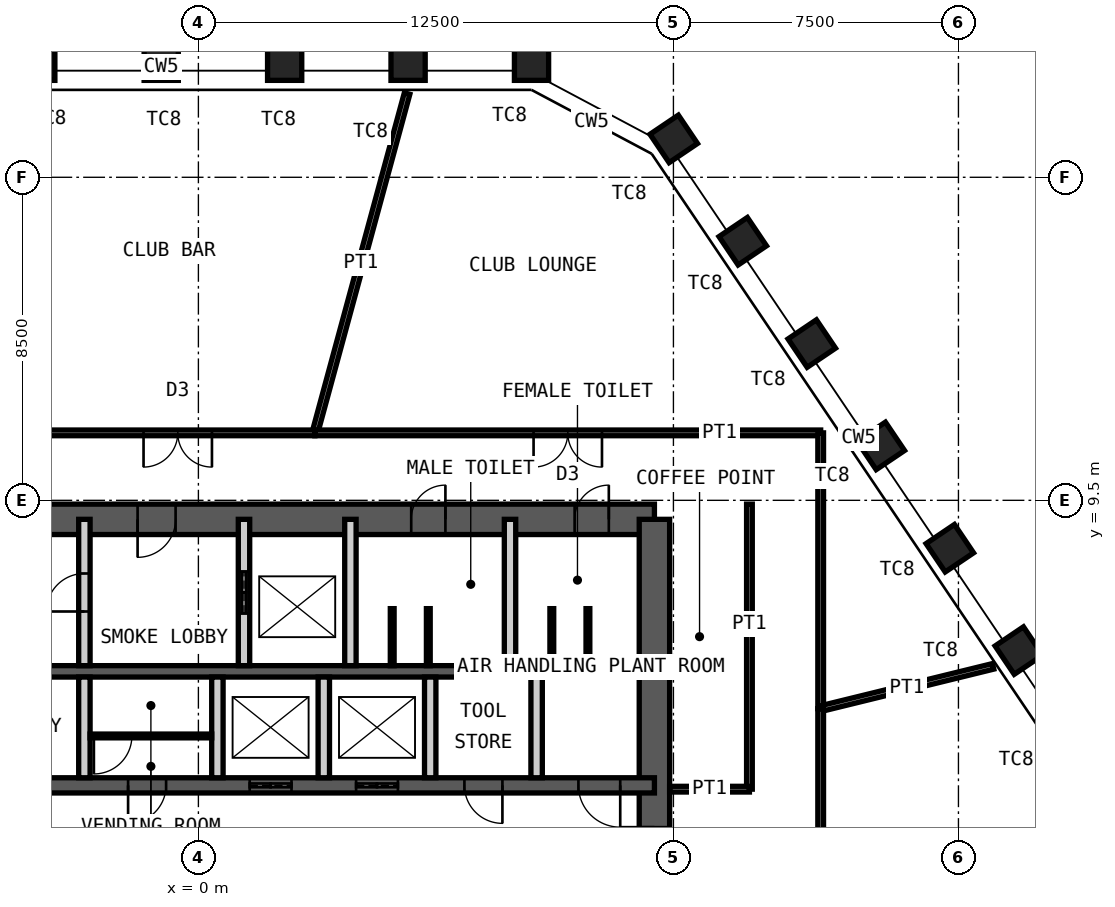
"""IFC4 building model, lengths in metres.
Left out: names, types, materials, properties, quantities, classifications, styles, units other than length and angle.
Written with IfcOpenShell. Run it as: python <this file> out.ifc"""

import sys

from ifc_helpers import new_model, si_unit, direction, frame, frame_2d, origin, origin_2d, place, context, subcontext, project, spatial, rectangle, hollow_rectangle, extrude, element, fill, save


model = new_model("IFC4")
c1 = context("Model", 3, precision=1e-05, world=origin(), true_north=direction((0.0, 1.0)))
c2 = subcontext(c1, "Body", "Model", "MODEL_VIEW")
j1 = project(units=[si_unit("LENGTHUNIT", "METRE"), si_unit("PLANEANGLEUNIT", "RADIAN")], contexts=[c1])
p1 = place(None, origin())
s1 = spatial("IfcSite", under=j1, at=p1, CompositionType="ELEMENT")
p2 = place(p1, origin())
s2 = spatial("IfcBuilding", under=s1, at=p2, CompositionType="ELEMENT")
p3 = place(p2, frame((0.0, 0.0, 320.8)))
s3 = spatial("IfcBuildingStorey", under=s2, at=p3, CompositionType="ELEMENT", Elevation=320.8)
for number, where, z_axis, x_axis in (
    (1, (-4.226, 21.0, 0.0), (0.0, 0.0, 1.0), (-1.0, 0.0, 0.0)),
    (2, (-0.978, 21.0, 0.0), (0.0, 0.0, 1.0), (-1.0, 0.0, 0.0)),
    (3, (2.27, 21.0, 0.0), (0.0, 0.0, 1.0), (-1.0, 0.0, 0.0)),
    (4, (5.518, 21.0, 0.0), (0.0, 0.0, 1.0), (-1.0, 0.0, 0.0)),
    (5, (8.766, 21.0, 0.0), (0.0, 0.0, 1.0), (-1.0, 0.0, 0.0)),
    (6, (12.508, 19.01, 0.0), (0.0, 0.0, 1.0), (-0.559, 0.829, 0.0)),
    (7, (14.324, 16.318, 0.0), (0.0, 0.0, 1.0), (-0.559, 0.829, 0.0)),
    (8, (16.141, 13.625, 0.0), (0.0, 0.0, 1.0), (-0.559, 0.829, 0.0)),
    (9, (17.957, 10.932, 0.0), (0.0, 0.0, 1.0), (-0.559, 0.829, 0.0)),
    (10, (19.773, 8.239, 0.0), (0.0, 0.0, 1.0), (-0.559, 0.829, 0.0)),
    (11, (21.589, 5.547, 0.0), (0.0, 0.0, 1.0), (-0.559, 0.829, 0.0)),
):
    element("IfcColumn", number, at=place(p3, frame(where, z_axis=z_axis, x_axis=x_axis)), inside=s3, PredefinedType="COLUMN", context=c2, shape_type="SweptSolid", body=[
        extrude(hollow_rectangle(XDim=0.9, YDim=0.9, WallThickness=0.05, at=origin_2d()), origin(), (0.0, 0.0, 1.0), 4.2),
    ])
p4 = place(p3, frame((-12.0, 9.0, 0.0), z_axis=(0.0, 0.0, 1.0), x_axis=(1.0, 0.0, 0.0)))
e12 = element("IfcWall", 12, at=p4, inside=s3, PredefinedType="SHEAR", context=c2, shape_type="SweptSolid", body=[
    extrude(rectangle(XDim=24.0, YDim=0.8, at=frame_2d((12.0, 0.0))), origin(), (0.0, 0.0, 1.0), 4.2),
])
p5 = place(p4, frame((10.4, 0.0, 0.0)))
e13 = element("IfcOpeningElement", 13, at=p5, cuts=e12, PredefinedType="OPENING", context=c2, shape_type="SweptSolid", body=[
    extrude(rectangle(XDim=1.0, YDim=2.1, at=frame_2d((0.5, 1.05))), frame((0.0, 0.41, 0.0), z_axis=(0.0, -1.0, 0.0), x_axis=(1.0, 0.0, 0.0)), (0.0, 0.0, 1.0), 0.82),
])
p6 = place(p4, frame((17.6, 0.0, 0.0)))
e14 = element("IfcOpeningElement", 14, at=p6, cuts=e12, PredefinedType="OPENING", context=c2, shape_type="SweptSolid", body=[
    extrude(rectangle(XDim=0.9, YDim=2.1, at=frame_2d((0.45, 1.05))), frame((0.0, 0.41, 0.0), z_axis=(0.0, -1.0, 0.0), x_axis=(1.0, 0.0, 0.0)), (0.0, 0.0, 1.0), 0.82),
])
p7 = place(p4, frame((21.9, 0.0, 0.0)))
e15 = element("IfcOpeningElement", 15, at=p7, cuts=e12, PredefinedType="OPENING", context=c2, shape_type="SweptSolid", body=[
    extrude(rectangle(XDim=0.9, YDim=2.1, at=frame_2d((0.45, 1.05))), frame((0.0, 0.41, 0.0), z_axis=(0.0, -1.0, 0.0), x_axis=(1.0, 0.0, 0.0)), (0.0, 0.0, 1.0), 0.82),
])
p8 = place(p3, frame((12.0, -9.0, 0.0), z_axis=(0.0, 0.0, 1.0), x_axis=(0.0, 1.0, 0.0)))
e16 = element("IfcWall", 16, at=p8, inside=s3, PredefinedType="SHEAR", context=c2, shape_type="SweptSolid", body=[
    extrude(rectangle(XDim=18.0, YDim=0.8, at=frame_2d((9.0, 0.0))), origin(), (0.0, 0.0, 1.0), 4.2),
])
p9 = place(p8, frame((8.1, 0.0, 0.0)))
e17 = element("IfcOpeningElement", 17, at=p9, cuts=e16, PredefinedType="OPENING", context=c2, shape_type="SweptSolid", body=[
    extrude(rectangle(XDim=1.8, YDim=2.1, at=frame_2d((0.9, 1.05))), frame((0.0, 0.41, 0.0), z_axis=(0.0, -1.0, 0.0), x_axis=(1.0, 0.0, 0.0)), (0.0, 0.0, 1.0), 0.82),
])
p10 = place(p3, frame((-12.0, 5.0, 0.0), z_axis=(0.0, 0.0, 1.0), x_axis=(1.0, 0.0, 0.0)))
e18 = element("IfcWall", 18, at=p10, inside=s3, PredefinedType="SHEAR", context=c2, shape_type="SweptSolid", body=[
    extrude(rectangle(XDim=24.0, YDim=0.3, at=frame_2d((12.0, 0.0))), origin(), (0.0, 0.0, 1.0), 4.2),
])
p11 = place(p3, frame((-12.0, 2.0, 0.0), z_axis=(0.0, 0.0, 1.0), x_axis=(1.0, 0.0, 0.0)))
e19 = element("IfcWall", 19, at=p11, inside=s3, PredefinedType="SHEAR", context=c2, shape_type="SweptSolid", body=[
    extrude(rectangle(XDim=24.0, YDim=0.4, at=frame_2d((12.0, 0.0))), origin(), (0.0, 0.0, 1.0), 4.2),
])
p12 = place(p11, frame((2.4, 0.0, 0.0)))
e20 = element("IfcOpeningElement", 20, at=p12, cuts=e19, PredefinedType="OPENING", context=c2, shape_type="SweptSolid", body=[
    extrude(rectangle(XDim=1.1, YDim=2.1, at=frame_2d((0.55, 1.05))), frame((0.0, 0.21, 0.0), z_axis=(0.0, -1.0, 0.0), x_axis=(1.0, 0.0, 0.0)), (0.0, 0.0, 1.0), 0.42),
])
p13 = place(p11, frame((22.0, 0.0, 0.0)))
e21 = element("IfcOpeningElement", 21, at=p13, cuts=e19, PredefinedType="OPENING", context=c2, shape_type="SweptSolid", body=[
    extrude(rectangle(XDim=1.1, YDim=2.1, at=frame_2d((0.55, 1.05))), frame((0.0, 0.21, 0.0), z_axis=(0.0, -1.0, 0.0), x_axis=(1.0, 0.0, 0.0)), (0.0, 0.0, 1.0), 0.42),
])
p14 = place(p11, frame((10.15, 0.0, 0.0)))
e22 = element("IfcOpeningElement", 22, at=p14, cuts=e19, PredefinedType="OPENING", context=c2, shape_type="SweptSolid", body=[
    extrude(rectangle(XDim=1.0, YDim=2.1, at=frame_2d((0.5, 1.05))), frame((0.0, 0.21, 0.0), z_axis=(0.0, -1.0, 0.0), x_axis=(1.0, 0.0, 0.0)), (0.0, 0.0, 1.0), 0.42),
])
p15 = place(p11, frame((6.9, 0.0, 0.0)))
e23 = element("IfcOpeningElement", 23, at=p15, cuts=e19, PredefinedType="OPENING", context=c2, shape_type="SweptSolid", body=[
    extrude(rectangle(XDim=1.0, YDim=2.1, at=frame_2d((0.5, 1.05))), frame((0.0, 0.21, 0.0), z_axis=(0.0, -1.0, 0.0), x_axis=(1.0, 0.0, 0.0)), (0.0, 0.0, 1.0), 0.42),
])
p16 = place(p11, frame((13.35, 0.0, 0.0)))
e24 = element("IfcOpeningElement", 24, at=p16, cuts=e19, PredefinedType="OPENING", context=c2, shape_type="SweptSolid", body=[
    extrude(rectangle(XDim=1.1, YDim=2.4, at=frame_2d((0.55, 1.2))), frame((0.0, 0.21, 0.0), z_axis=(0.0, -1.0, 0.0), x_axis=(1.0, 0.0, 0.0)), (0.0, 0.0, 1.0), 0.42),
])
p17 = place(p11, frame((16.15, 0.0, 0.0)))
e25 = element("IfcOpeningElement", 25, at=p17, cuts=e19, PredefinedType="OPENING", context=c2, shape_type="SweptSolid", body=[
    extrude(rectangle(XDim=1.1, YDim=2.4, at=frame_2d((0.55, 1.2))), frame((0.0, 0.21, 0.0), z_axis=(0.0, -1.0, 0.0), x_axis=(1.0, 0.0, 0.0)), (0.0, 0.0, 1.0), 0.42),
])
p18 = place(p11, frame((19.0, 0.0, 0.0)))
e26 = element("IfcOpeningElement", 26, at=p18, cuts=e19, PredefinedType="OPENING", context=c2, shape_type="SweptSolid", body=[
    extrude(rectangle(XDim=1.0, YDim=2.1, at=frame_2d((0.5, 1.05))), frame((0.0, 0.21, 0.0), z_axis=(0.0, -1.0, 0.0), x_axis=(1.0, 0.0, 0.0)), (0.0, 0.0, 1.0), 0.42),
])
p19 = place(p3, frame((-3.0, 5.15, 0.0), z_axis=(0.0, 0.0, 1.0), x_axis=(0.0, 1.0, 0.0)))
e27 = element("IfcWall", 27, at=p19, inside=s3, PredefinedType="PARTITIONING", context=c2, shape_type="SweptSolid", body=[
    extrude(rectangle(XDim=3.85, YDim=0.3, at=frame_2d((1.925, 0.0))), origin(), (0.0, 0.0, 1.0), 3.98),
])
p20 = place(p19, frame((1.425, 0.0, 0.0)))
e28 = element("IfcOpeningElement", 28, at=p20, cuts=e27, PredefinedType="OPENING", context=c2, shape_type="SweptSolid", body=[
    extrude(rectangle(XDim=1.0, YDim=2.1, at=frame_2d((0.5, 1.05))), frame((0.0, 0.16, 0.0), z_axis=(0.0, -1.0, 0.0), x_axis=(1.0, 0.0, 0.0)), (0.0, 0.0, 1.0), 0.32),
])
p21 = place(p3, frame((1.2, 5.15, 0.0), z_axis=(0.0, 0.0, 1.0), x_axis=(0.0, 1.0, 0.0)))
e29 = element("IfcWall", 29, at=p21, inside=s3, PredefinedType="PARTITIONING", context=c2, shape_type="SweptSolid", body=[
    extrude(rectangle(XDim=3.85, YDim=0.3, at=frame_2d((1.925, 0.0))), origin(), (0.0, 0.0, 1.0), 3.98),
])
p22 = place(p21, frame((1.375, 0.0, 0.0)))
e30 = element("IfcOpeningElement", 30, at=p22, cuts=e29, PredefinedType="OPENING", context=c2, shape_type="SweptSolid", body=[
    extrude(rectangle(XDim=1.1, YDim=2.4, at=frame_2d((0.55, 1.2))), frame((0.0, 0.16, 0.0), z_axis=(0.0, -1.0, 0.0), x_axis=(1.0, 0.0, 0.0)), (0.0, 0.0, 1.0), 0.32),
])
for number, where, z_axis, x_axis in (
    (31, (4.0, 5.15, 0.0), (0.0, 0.0, 1.0), (0.0, 1.0, 0.0)),
    (32, (8.2, 5.15, 0.0), (0.0, 0.0, 1.0), (0.0, 1.0, 0.0)),
):
    element("IfcWall", number, at=place(p3, frame(where, z_axis=z_axis, x_axis=x_axis)), inside=s3, PredefinedType="PARTITIONING", context=c2, shape_type="SweptSolid", body=[
        extrude(rectangle(XDim=3.85, YDim=0.3, at=frame_2d((1.925, 0.0))), origin(), (0.0, 0.0, 1.0), 3.98),
    ])
for number, where, z_axis, x_axis in (
    (33, (-3.0, 2.2, 0.0), (0.0, 0.0, 1.0), (0.0, 1.0, 0.0)),
    (34, (0.5, 2.2, 0.0), (0.0, 0.0, 1.0), (0.0, 1.0, 0.0)),
    (35, (3.3, 2.2, 0.0), (0.0, 0.0, 1.0), (0.0, 1.0, 0.0)),
    (36, (6.1, 2.2, 0.0), (0.0, 0.0, 1.0), (0.0, 1.0, 0.0)),
    (37, (8.9, 2.2, 0.0), (0.0, 0.0, 1.0), (0.0, 1.0, 0.0)),
):
    element("IfcWall", number, at=place(p3, frame(where, z_axis=z_axis, x_axis=x_axis)), inside=s3, PredefinedType="PARTITIONING", context=c2, shape_type="SweptSolid", body=[
        extrude(rectangle(XDim=2.65, YDim=0.3, at=frame_2d((1.325, 0.0))), origin(), (0.0, 0.0, 1.0), 3.98),
    ])
p23 = place(p3, frame((-2.85, 3.3, 0.0), z_axis=(0.0, 0.0, 1.0), x_axis=(1.0, 0.0, 0.0)))
e38 = element("IfcWall", 38, at=p23, inside=s3, PredefinedType="PARTITIONING", context=c2, shape_type="SweptSolid", body=[
    extrude(rectangle(XDim=3.2, YDim=0.1, at=frame_2d((1.6, 0.0))), origin(), (0.0, 0.0, 1.0), 3.98),
])
p24 = place(p23, frame((0.1, 0.0, 0.0)))
e39 = element("IfcOpeningElement", 39, at=p24, cuts=e38, PredefinedType="OPENING", context=c2, shape_type="SweptSolid", body=[
    extrude(rectangle(XDim=1.0, YDim=2.4, at=frame_2d((0.5, 1.2))), frame((0.0, 0.06, 0.0), z_axis=(0.0, -1.0, 0.0), x_axis=(1.0, 0.0, 0.0)), (0.0, 0.0, 1.0), 0.12),
])
for number, where, z_axis, x_axis in (
    (40, (5.1, 5.15, 0.0), (0.0, 0.0, 1.0), (0.0, 1.0, 0.0)),
    (41, (6.05, 5.15, 0.0), (0.0, 0.0, 1.0), (0.0, 1.0, 0.0)),
    (42, (9.3, 5.15, 0.0), (0.0, 0.0, 1.0), (0.0, 1.0, 0.0)),
    (43, (10.25, 5.15, 0.0), (0.0, 0.0, 1.0), (0.0, 1.0, 0.0)),
):
    element("IfcWall", number, at=place(p3, frame(where, z_axis=z_axis, x_axis=x_axis)), inside=s3, PredefinedType="PARTITIONING", context=c2, shape_type="SweptSolid", body=[
        extrude(rectangle(XDim=1.5, YDim=0.1, at=frame_2d((0.75, 0.0))), origin(), (0.0, 0.0, 1.0), 2.1),
    ])
p25 = place(p3, frame((5.492, 20.204, 0.0), z_axis=(0.0, 0.0, 1.0), x_axis=(-0.262302393053, -0.964985727666, 0.0)))
e44 = element("IfcWall", 44, at=p25, inside=s3, PredefinedType="PARTITIONING", context=c2, shape_type="SweptSolid", body=[
    extrude(rectangle(XDim=9.253, YDim=0.15, at=frame_2d((4.626, 0.0))), origin(), (0.0, 0.0, 1.0), 3.33),
])
p26 = place(p3, frame((3.065, 11.275, 0.0), z_axis=(0.0, 0.0, 1.0), x_axis=(1.0, 0.0, 0.0)))
e45 = element("IfcWall", 45, at=p26, inside=s3, PredefinedType="PARTITIONING", context=c2, shape_type="SweptSolid", body=[
    extrude(rectangle(XDim=13.31, YDim=0.15, at=frame_2d((6.655, 0.0))), origin(), (0.0, 0.0, 1.0), 4.03),
])
p27 = place(p26, frame((5.755, 0.0, 0.0)))
e46 = element("IfcOpeningElement", 46, at=p27, cuts=e45, PredefinedType="OPENING", context=c2, shape_type="SweptSolid", body=[
    extrude(rectangle(XDim=1.8, YDim=2.4, at=frame_2d((0.9, 1.2))), frame((0.0, 0.085, 0.0), z_axis=(0.0, -1.0, 0.0), x_axis=(1.0, 0.0, 0.0)), (0.0, 0.0, 1.0), 0.17),
])
p28 = place(p3, frame((16.375, 11.275, 0.0), z_axis=(0.0, 0.0, 1.0), x_axis=(0.0, -1.0, 0.0)))
e47 = element("IfcWall", 47, at=p28, inside=s3, PredefinedType="PARTITIONING", context=c2, shape_type="SweptSolid", body=[
    extrude(rectangle(XDim=7.257, YDim=0.15, at=frame_2d((3.628, 0.0))), origin(), (0.0, 0.0, 1.0), 4.03),
])
p29 = place(p3, frame((20.912, 5.131, 0.0), z_axis=(0.0, 0.0, 1.0), x_axis=(-0.97118779717, -0.238315468713, 0.0)))
e48 = element("IfcWall", 48, at=p29, inside=s3, PredefinedType="PARTITIONING", context=c2, shape_type="SweptSolid", body=[
    extrude(rectangle(XDim=4.671, YDim=0.15, at=frame_2d((2.336, 0.0))), origin(), (0.0, 0.0, 1.0), 4.03),
])
p30 = place(p3, frame((16.375, 4.018, 0.0), z_axis=(0.0, 0.0, 1.0), x_axis=(0.0, -1.0, 0.0)))
e49 = element("IfcWall", 49, at=p30, inside=s3, PredefinedType="PARTITIONING", context=c2, shape_type="SweptSolid", body=[
    extrude(rectangle(XDim=15.293, YDim=0.15, at=frame_2d((7.646, 0.0))), origin(), (0.0, 0.0, 1.0), 4.03),
])
p31 = place(p30, frame((6.747, 0.0, 0.0)))
e50 = element("IfcOpeningElement", 50, at=p31, cuts=e49, PredefinedType="OPENING", context=c2, shape_type="SweptSolid", body=[
    extrude(rectangle(XDim=1.8, YDim=2.4, at=frame_2d((0.9, 1.2))), frame((0.0, 0.085, 0.0), z_axis=(0.0, -1.0, 0.0), x_axis=(1.0, 0.0, 0.0)), (0.0, 0.0, 1.0), 0.17),
])
p32 = place(p3, frame((-4.151, 11.275, 0.0), z_axis=(0.0, 0.0, 1.0), x_axis=(1.0, 0.0, 0.0)))
e51 = element("IfcWall", 51, at=p32, inside=s3, PredefinedType="PARTITIONING", context=c2, shape_type="SweptSolid", body=[
    extrude(rectangle(XDim=7.216, YDim=0.15, at=frame_2d((3.608, 0.0))), origin(), (0.0, 0.0, 1.0), 4.03),
])
p33 = place(p32, frame((2.708, 0.0, 0.0)))
e52 = element("IfcOpeningElement", 52, at=p33, cuts=e51, PredefinedType="OPENING", context=c2, shape_type="SweptSolid", body=[
    extrude(rectangle(XDim=1.8, YDim=2.4, at=frame_2d((0.9, 1.2))), frame((0.0, 0.085, 0.0), z_axis=(0.0, -1.0, 0.0), x_axis=(1.0, 0.0, 0.0)), (0.0, 0.0, 1.0), 0.17),
])
p34 = place(p3, frame((14.5, 1.9, 0.0), z_axis=(0.0, 0.0, 1.0), x_axis=(0.0, 1.0, 0.0)))
e53 = element("IfcWall", 53, at=p34, inside=s3, PredefinedType="PARTITIONING", context=c2, shape_type="SweptSolid", body=[
    extrude(rectangle(XDim=7.5, YDim=0.15, at=frame_2d((3.75, 0.0))), origin(), (0.0, 0.0, 1.0), 4.03),
])
p35 = place(p3, frame((12.4, 1.9, 0.0), z_axis=(0.0, 0.0, 1.0), x_axis=(1.0, 0.0, 0.0)))
e54 = element("IfcWall", 54, at=p35, inside=s3, PredefinedType="PARTITIONING", context=c2, shape_type="SweptSolid", body=[
    extrude(rectangle(XDim=2.1, YDim=0.15, at=frame_2d((1.05, 0.0))), origin(), (0.0, 0.0, 1.0), 2.93),
])
p36 = place(p5, origin())
e55 = element("IfcDoor", 55, at=p36, inside=s3, OperationType="SINGLE_SWING_LEFT", PredefinedType="DOOR", context=c2, shape_type="SweptSolid", body=[
    extrude(rectangle(XDim=1.0, YDim=2.1, at=frame_2d((0.5, 1.05))), frame((0.0, 0.025, 0.0), z_axis=(0.0, -1.0, 0.0), x_axis=(1.0, 0.0, 0.0)), (0.0, 0.0, 1.0), 0.05),
])
fill(e13, e55)
p37 = place(p6, origin())
e56 = element("IfcDoor", 56, at=p37, inside=s3, OperationType="SINGLE_SWING_LEFT", PredefinedType="DOOR", context=c2, shape_type="SweptSolid", body=[
    extrude(rectangle(XDim=0.9, YDim=2.1, at=frame_2d((0.45, 1.05))), frame((0.0, 0.025, 0.0), z_axis=(0.0, -1.0, 0.0), x_axis=(1.0, 0.0, 0.0)), (0.0, 0.0, 1.0), 0.05),
])
fill(e14, e56)
p38 = place(p7, origin())
e57 = element("IfcDoor", 57, at=p38, inside=s3, OperationType="SINGLE_SWING_LEFT", PredefinedType="DOOR", context=c2, shape_type="SweptSolid", body=[
    extrude(rectangle(XDim=0.9, YDim=2.1, at=frame_2d((0.45, 1.05))), frame((0.0, 0.025, 0.0), z_axis=(0.0, -1.0, 0.0), x_axis=(1.0, 0.0, 0.0)), (0.0, 0.0, 1.0), 0.05),
])
fill(e15, e57)
p39 = place(p20, origin())
e58 = element("IfcDoor", 58, at=p39, inside=s3, OperationType="SINGLE_SWING_RIGHT", PredefinedType="DOOR", context=c2, shape_type="SweptSolid", body=[
    extrude(rectangle(XDim=1.0, YDim=2.1, at=frame_2d((0.5, 1.05))), frame((0.0, 0.025, 0.0), z_axis=(0.0, -1.0, 0.0), x_axis=(1.0, 0.0, 0.0)), (0.0, 0.0, 1.0), 0.05),
])
fill(e28, e58)
p40 = place(p13, origin())
e59 = element("IfcDoor", 59, at=p40, inside=s3, OperationType="SINGLE_SWING_RIGHT", PredefinedType="DOOR", context=c2, shape_type="SweptSolid", body=[
    extrude(rectangle(XDim=1.1, YDim=2.1, at=frame_2d((0.55, 1.05))), frame((0.0, 0.025, 0.0), z_axis=(0.0, -1.0, 0.0), x_axis=(1.0, 0.0, 0.0)), (0.0, 0.0, 1.0), 0.05),
])
fill(e21, e59)
p41 = place(p14, origin())
e60 = element("IfcDoor", 60, at=p41, inside=s3, OperationType="SINGLE_SWING_LEFT", PredefinedType="DOOR", context=c2, shape_type="SweptSolid", body=[
    extrude(rectangle(XDim=1.0, YDim=2.1, at=frame_2d((0.5, 1.05))), frame((0.0, 0.025, 0.0), z_axis=(0.0, -1.0, 0.0), x_axis=(1.0, 0.0, 0.0)), (0.0, 0.0, 1.0), 0.05),
])
fill(e22, e60)
p42 = place(p9, origin())
e61 = element("IfcDoor", 61, at=p42, inside=s3, OperationType="DOUBLE_DOOR_DOUBLE_SWING", PredefinedType="DOOR", context=c2, shape_type="SweptSolid", body=[
    extrude(rectangle(XDim=1.8, YDim=2.1, at=frame_2d((0.9, 1.05))), frame((0.0, 0.025, 0.0), z_axis=(0.0, -1.0, 0.0), x_axis=(1.0, 0.0, 0.0)), (0.0, 0.0, 1.0), 0.05),
])
fill(e17, e61)
p43 = place(p22, origin())
e62 = element("IfcDoor", 62, at=p43, inside=s3, OperationType="DOUBLE_DOOR_SLIDING", PredefinedType="DOOR", context=c2, shape_type="SweptSolid", body=[
    extrude(rectangle(XDim=1.1, YDim=2.4, at=frame_2d((0.55, 1.2))), frame((0.0, 0.025, 0.0), z_axis=(0.0, -1.0, 0.0), x_axis=(1.0, 0.0, 0.0)), (0.0, 0.0, 1.0), 0.05),
])
fill(e30, e62)
p44 = place(p16, origin())
e63 = element("IfcDoor", 63, at=p44, inside=s3, OperationType="DOUBLE_DOOR_SLIDING", PredefinedType="DOOR", context=c2, shape_type="SweptSolid", body=[
    extrude(rectangle(XDim=1.1, YDim=2.4, at=frame_2d((0.55, 1.2))), frame((0.0, 0.025, 0.0), z_axis=(0.0, -1.0, 0.0), x_axis=(1.0, 0.0, 0.0)), (0.0, 0.0, 1.0), 0.05),
])
fill(e24, e63)
p45 = place(p17, origin())
e64 = element("IfcDoor", 64, at=p45, inside=s3, OperationType="DOUBLE_DOOR_SLIDING", PredefinedType="DOOR", context=c2, shape_type="SweptSolid", body=[
    extrude(rectangle(XDim=1.1, YDim=2.4, at=frame_2d((0.55, 1.2))), frame((0.0, 0.025, 0.0), z_axis=(0.0, -1.0, 0.0), x_axis=(1.0, 0.0, 0.0)), (0.0, 0.0, 1.0), 0.05),
])
fill(e25, e64)
p46 = place(p18, origin())
e65 = element("IfcDoor", 65, at=p46, inside=s3, OperationType="SINGLE_SWING_RIGHT", PredefinedType="DOOR", context=c2, shape_type="SweptSolid", body=[
    extrude(rectangle(XDim=1.0, YDim=2.1, at=frame_2d((0.5, 1.05))), frame((0.0, 0.025, 0.0), z_axis=(0.0, -1.0, 0.0), x_axis=(1.0, 0.0, 0.0)), (0.0, 0.0, 1.0), 0.05),
])
fill(e26, e65)
p47 = place(p24, origin())
e66 = element("IfcDoor", 66, at=p47, inside=s3, OperationType="SINGLE_SWING_LEFT", PredefinedType="DOOR", context=c2, shape_type="SweptSolid", body=[
    extrude(rectangle(XDim=1.0, YDim=2.4, at=frame_2d((0.5, 1.2))), frame((0.0, 0.025, 0.0), z_axis=(0.0, -1.0, 0.0), x_axis=(1.0, 0.0, 0.0)), (0.0, 0.0, 1.0), 0.05),
])
fill(e39, e66)
p48 = place(p27, origin())
e67 = element("IfcDoor", 67, at=p48, inside=s3, OperationType="DOUBLE_DOOR_DOUBLE_SWING", PredefinedType="DOOR", context=c2, shape_type="SweptSolid", body=[
    extrude(rectangle(XDim=1.8, YDim=2.4, at=frame_2d((0.9, 1.2))), frame((0.0, 0.025, 0.0), z_axis=(0.0, -1.0, 0.0), x_axis=(1.0, 0.0, 0.0)), (0.0, 0.0, 1.0), 0.05),
])
fill(e46, e67)
p49 = place(p33, origin())
e68 = element("IfcDoor", 68, at=p49, inside=s3, OperationType="DOUBLE_DOOR_DOUBLE_SWING", PredefinedType="DOOR", context=c2, shape_type="SweptSolid", body=[
    extrude(rectangle(XDim=1.8, YDim=2.4, at=frame_2d((0.9, 1.2))), frame((0.0, 0.025, 0.0), z_axis=(0.0, -1.0, 0.0), x_axis=(1.0, 0.0, 0.0)), (0.0, 0.0, 1.0), 0.05),
])
fill(e52, e68)
save(model, sys.argv[1])
